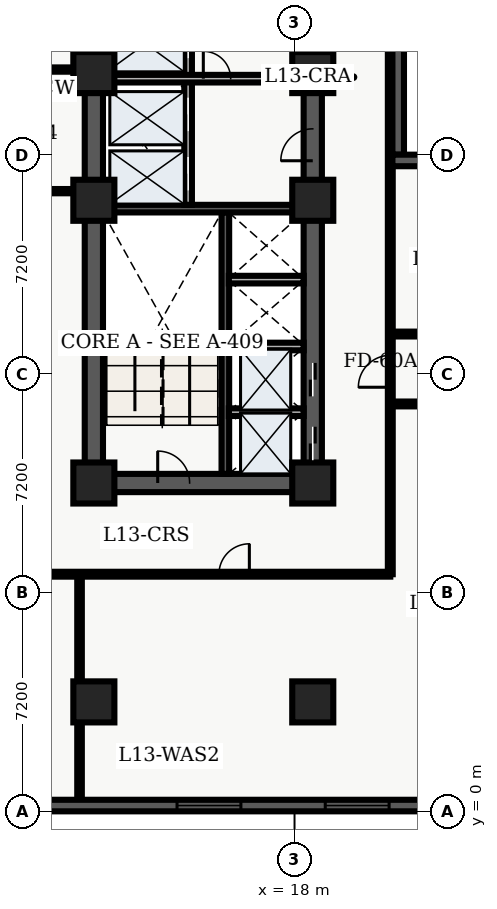
"""IFC4 building model, lengths in metres.
Left out: names, types, materials, properties, quantities, classifications, styles, units other than length and angle.
Written with IfcOpenShell. Run it as: python <this file> out.ifc"""

import sys

from ifc_helpers import new_model, entity, si_unit, converted_unit, direction, frame, origin_with_axes, origin_2d_with_axis, place, context, subcontext, project, spatial, polyline, rectangle, outline, extrude, element, fill, save


model = new_model("IFC4")
c1 = context("Model", 3, precision=1e-05, world=origin_with_axes(), true_north=direction((0.0, 1.0)))
c2 = subcontext(c1, "Body", "Model", "MODEL_VIEW")
j1 = project(units=[si_unit("LENGTHUNIT", "METRE"), converted_unit("PLANEANGLEUNIT", "DEGREE", entity("IfcPlaneAngleMeasure", 0.017), si_unit("PLANEANGLEUNIT", "RADIAN"), dimensions=[0, 0, 0, 0, 0, 0, 0])], contexts=[c1])
p1 = place(None, origin_with_axes())
s1 = spatial("IfcSite", under=j1, at=p1, CompositionType="ELEMENT")
p2 = place(p1, origin_with_axes())
s2 = spatial("IfcBuilding", under=s1, at=p2, CompositionType="ELEMENT")
p3 = place(p2, frame((0.0, 0.0, 56.1), z_axis=(0.0, 0.0, 1.0), x_axis=(1.0, 0.0, 0.0)))
s3 = spatial("IfcBuildingStorey", under=s2, at=p3, CompositionType="ELEMENT", Elevation=56.1)
p4 = place(p3, frame((11.4, 10.8, 0.0), z_axis=(0.0, 0.0, 1.0), x_axis=(0.0, 1.0, 0.0)))
e1 = element("IfcWall", 1, at=p4, inside=s3, PredefinedType="SHEAR", context=c2, shape_type="SweptSolid", body=[
    extrude(outline(polyline([(0.0, -0.3), (27.0, -0.3), (27.0, 0.3), (0.0, 0.3), (0.0, -0.3)])), origin_with_axes(), (0.0, 0.0, 1.0), 3.66),
])
p5 = place(p3, frame((11.4, 10.8, 0.0), z_axis=(0.0, 0.0, 1.0), x_axis=(1.0, 0.0, 0.0)))
e2 = element("IfcWall", 2, at=p5, inside=s3, PredefinedType="SHEAR", context=c2, shape_type="SweptSolid", body=[
    extrude(outline(polyline([(0.0, -0.3), (7.2, -0.3), (7.2, 0.3), (0.0, 0.3), (0.0, -0.3)])), origin_with_axes(), (0.0, 0.0, 1.0), 3.66),
])
p6 = place(p5, frame((2.625, 0.0, 0.0), z_axis=(0.0, 0.0, 1.0), x_axis=(1.0, 0.0, 0.0)))
e3 = element("IfcOpeningElement", 3, at=p6, cuts=e2, PredefinedType="OPENING", context=c2, shape_type="SweptSolid", body=[
    extrude(rectangle(XDim=1.05, YDim=0.62, at=origin_2d_with_axis()), origin_with_axes(), (0.0, 0.0, 1.0), 2.15),
])
p7 = place(p3, frame((18.6, 10.8, 0.0), z_axis=(0.0, 0.0, 1.0), x_axis=(0.0, 1.0, 0.0)))
e4 = element("IfcWall", 4, at=p7, inside=s3, PredefinedType="SHEAR", context=c2, shape_type="SweptSolid", body=[
    extrude(outline(polyline([(0.0, -0.3), (13.5, -0.3), (13.5, 0.3), (0.0, 0.3), (0.0, -0.3)])), origin_with_axes(), (0.0, 0.0, 1.0), 3.66),
])
p8 = place(p7, frame((1.3, 0.0, 0.0), z_axis=(0.0, 0.0, 1.0), x_axis=(1.0, 0.0, 0.0)))
e5 = element("IfcOpeningElement", 5, at=p8, cuts=e4, PredefinedType="OPENING", context=c2, shape_type="SweptSolid", body=[
    extrude(rectangle(XDim=1.1, YDim=0.62, at=origin_2d_with_axis()), origin_with_axes(), (0.0, 0.0, 1.0), 2.15),
])
p9 = place(p7, frame((3.4, 0.0, 0.0), z_axis=(0.0, 0.0, 1.0), x_axis=(1.0, 0.0, 0.0)))
e6 = element("IfcOpeningElement", 6, at=p9, cuts=e4, PredefinedType="OPENING", context=c2, shape_type="SweptSolid", body=[
    extrude(rectangle(XDim=1.1, YDim=0.62, at=origin_2d_with_axis()), origin_with_axes(), (0.0, 0.0, 1.0), 2.15),
])
p10 = place(p7, frame((11.125, 0.0, 0.0), z_axis=(0.0, 0.0, 1.0), x_axis=(1.0, 0.0, 0.0)))
e7 = element("IfcOpeningElement", 7, at=p10, cuts=e4, PredefinedType="OPENING", context=c2, shape_type="SweptSolid", body=[
    extrude(rectangle(XDim=1.05, YDim=0.62, at=origin_2d_with_axis()), origin_with_axes(), (0.0, 0.0, 1.0), 2.15),
])
p11 = place(p3, frame((18.6, 24.3, 0.0), z_axis=(0.0, 0.0, 1.0), x_axis=(0.0, 1.0, 0.0)))
e8 = element("IfcWall", 8, at=p11, inside=s3, PredefinedType="SHEAR", context=c2, shape_type="SweptSolid", body=[
    extrude(outline(polyline([(0.0, -0.3), (13.5, -0.3), (13.5, 0.3), (0.0, 0.3), (0.0, -0.3)])), origin_with_axes(), (0.0, 0.0, 1.0), 3.66),
])
p12 = place(p11, frame((6.725, 0.0, 0.0), z_axis=(0.0, 0.0, 1.0), x_axis=(1.0, 0.0, 0.0)))
e9 = element("IfcOpeningElement", 9, at=p12, cuts=e8, PredefinedType="OPENING", context=c2, shape_type="SweptSolid", body=[
    extrude(rectangle(XDim=1.05, YDim=0.62, at=origin_2d_with_axis()), origin_with_axes(), (0.0, 0.0, 1.0), 2.15),
])
p13 = place(p3, frame((15.725, 11.1, 0.0), z_axis=(0.0, 0.0, 1.0), x_axis=(0.0, 1.0, 0.0)))
e10 = element("IfcWall", 10, at=p13, inside=s3, PredefinedType="SHEAR", context=c2, shape_type="SweptSolid", body=[
    extrude(outline(polyline([(0.0, -0.125), (8.6, -0.125), (8.6, 0.125), (0.0, 0.125), (0.0, -0.125)])), origin_with_axes(), (0.0, 0.0, 1.0), 3.66),
])
p14 = place(p3, frame((11.7, 19.825, 0.0), z_axis=(0.0, 0.0, 1.0), x_axis=(1.0, 0.0, 0.0)))
e11 = element("IfcWall", 11, at=p14, inside=s3, PredefinedType="SHEAR", context=c2, shape_type="SweptSolid", body=[
    extrude(outline(polyline([(0.0, -0.125), (6.6, -0.125), (6.6, 0.125), (0.0, 0.125), (0.0, -0.125)])), origin_with_axes(), (0.0, 0.0, 1.0), 3.66),
])
p15 = place(p3, frame((14.5, 19.95, 0.0), z_axis=(0.0, 0.0, 1.0), x_axis=(0.0, 1.0, 0.0)))
e12 = element("IfcWall", 12, at=p15, inside=s3, PredefinedType="SOLIDWALL", context=c2, shape_type="SweptSolid", body=[
    extrude(outline(polyline([(0.0, -0.125), (6.25, -0.125), (6.25, 0.125), (0.0, 0.125), (0.0, -0.125)])), origin_with_axes(), (0.0, 0.0, 1.0), 2.7),
])
p16 = place(p15, frame((1.025, 0.0, 0.0), z_axis=(0.0, 0.0, 1.0), x_axis=(1.0, 0.0, 0.0)))
e13 = element("IfcOpeningElement", 13, at=p16, cuts=e12, PredefinedType="OPENING", context=c2, shape_type="SweptSolid", body=[
    extrude(rectangle(XDim=1.1, YDim=0.27, at=origin_2d_with_axis()), origin_with_axes(), (0.0, 0.0, 1.0), 2.15),
])
p17 = place(p15, frame((2.975, 0.0, 0.0), z_axis=(0.0, 0.0, 1.0), x_axis=(1.0, 0.0, 0.0)))
e14 = element("IfcOpeningElement", 14, at=p17, cuts=e12, PredefinedType="OPENING", context=c2, shape_type="SweptSolid", body=[
    extrude(rectangle(XDim=1.1, YDim=0.27, at=origin_2d_with_axis()), origin_with_axes(), (0.0, 0.0, 1.0), 2.15),
])
p18 = place(p15, frame((5.425, 0.0, 0.0), z_axis=(0.0, 0.0, 1.0), x_axis=(1.0, 0.0, 0.0)))
e15 = element("IfcOpeningElement", 15, at=p18, cuts=e12, PredefinedType="OPENING", context=c2, shape_type="SweptSolid", body=[
    extrude(rectangle(XDim=1.2, YDim=0.27, at=origin_2d_with_axis()), origin_with_axes(), (0.0, 0.0, 1.0), 2.15),
])
p19 = place(p3, frame((11.7, 24.1, 0.0), z_axis=(0.0, 0.0, 1.0), x_axis=(1.0, 0.0, 0.0)))
e16 = element("IfcWall", 16, at=p19, inside=s3, PredefinedType="SOLIDWALL", context=c2, shape_type="SweptSolid", body=[
    extrude(outline(polyline([(0.0, -0.125), (6.6, -0.125), (6.6, 0.125), (0.0, 0.125), (0.0, -0.125)])), origin_with_axes(), (0.0, 0.0, 1.0), 2.7),
])
p20 = place(p19, frame((3.75, 0.0, 0.0), z_axis=(0.0, 0.0, 1.0), x_axis=(1.0, 0.0, 0.0)))
e17 = element("IfcOpeningElement", 17, at=p20, cuts=e16, PredefinedType="OPENING", context=c2, shape_type="SweptSolid", body=[
    extrude(rectangle(XDim=0.9, YDim=0.27, at=origin_2d_with_axis()), origin_with_axes(), (0.0, 0.0, 1.0), 2.15),
])
for number, where, z_axis, x_axis in (
    (18, (11.4, 3.6, 0.0), (0.0, 0.0, 1.0), (1.0, 0.0, 0.0)),
    (19, (11.4, 10.8, 0.0), (0.0, 0.0, 1.0), (1.0, 0.0, 0.0)),
    (20, (11.4, 20.1, 0.0), (0.0, 0.0, 1.0), (1.0, 0.0, 0.0)),
    (21, (11.4, 24.3, 0.0), (0.0, 0.0, 1.0), (1.0, 0.0, 0.0)),
    (22, (18.6, 3.6, 0.0), (0.0, 0.0, 1.0), (1.0, 0.0, 0.0)),
    (23, (18.6, 10.8, 0.0), (0.0, 0.0, 1.0), (1.0, 0.0, 0.0)),
    (24, (18.6, 20.1, 0.0), (0.0, 0.0, 1.0), (1.0, 0.0, 0.0)),
    (25, (18.6, 24.3, 0.0), (0.0, 0.0, 1.0), (1.0, 0.0, 0.0)),
):
    element("IfcColumn", number, at=place(p3, frame(where, z_axis=z_axis, x_axis=x_axis)), inside=s3, PredefinedType="COLUMN", context=c2, shape_type="SweptSolid", body=[
        extrude(rectangle(XDim=1.35, YDim=1.35, at=origin_2d_with_axis()), origin_with_axes(), (0.0, 0.0, 1.0), 3.9),
    ])
for number, where, z_axis, x_axis in (
    (26, (15.84, 13.13, 0.0), (0.0, 0.0, 1.0), (1.0, 0.0, 0.0)),
    (27, (15.84, 15.29, 0.0), (0.0, 0.0, 1.0), (1.0, 0.0, 0.0)),
    (28, (15.84, 17.49, 0.0), (0.0, 0.0, 1.0), (1.0, 0.0, 0.0)),
):
    element("IfcWall", number, at=place(p3, frame(where, z_axis=z_axis, x_axis=x_axis)), inside=s3, PredefinedType="SOLIDWALL", context=c2, shape_type="SweptSolid", body=[
        extrude(outline(polyline([(0.0, -0.125), (2.46, -0.125), (2.46, 0.125), (0.0, 0.125), (0.0, -0.125)])), origin_with_axes(), (0.0, 0.0, 1.0), 2.7),
    ])
for number, where, z_axis, x_axis in (
    (29, (9.52, 20.4, 0.0), (0.0, 0.0, 1.0), (1.0, 0.0, 0.0)),
    (30, (9.52, 24.4, 0.0), (0.0, 0.0, 1.0), (1.0, 0.0, 0.0)),
):
    element("IfcWall", number, at=place(p3, frame(where, z_axis=z_axis, x_axis=x_axis)), inside=s3, PredefinedType="PARTITIONING", context=c2, shape_type="SweptSolid", body=[
        extrude(outline(polyline([(0.0, -0.07), (1.58, -0.07), (1.58, 0.07), (0.0, 0.07), (0.0, -0.07)])), origin_with_axes(), (0.0, 0.0, 1.0), 2.7),
    ])
p21 = place(p3, frame((2.6, 7.8, 0.0), z_axis=(0.0, 0.0, 1.0), x_axis=(1.0, 0.0, 0.0)))
e31 = element("IfcWall", 31, at=p21, inside=s3, PredefinedType="PARTITIONING", context=c2, shape_type="SweptSolid", body=[
    extrude(outline(polyline([(0.0, -0.08), (18.55, -0.08), (18.55, 0.08), (0.0, 0.08), (0.0, -0.08)])), origin_with_axes(), (0.0, 0.0, 1.0), 2.7),
])
p22 = place(p21, frame((2.91, 0.0, 0.0), z_axis=(0.0, 0.0, 1.0), x_axis=(1.0, 0.0, 0.0)))
e32 = element("IfcOpeningElement", 32, at=p22, cuts=e31, PredefinedType="OPENING", context=c2, shape_type="SweptSolid", body=[
    extrude(rectangle(XDim=1.2, YDim=0.18, at=origin_2d_with_axis()), origin_with_axes(), (0.0, 0.0, 1.0), 2.2),
])
p23 = place(p21, frame((13.415, 0.0, 0.0), z_axis=(0.0, 0.0, 1.0), x_axis=(1.0, 0.0, 0.0)))
e33 = element("IfcOpeningElement", 33, at=p23, cuts=e31, PredefinedType="OPENING", context=c2, shape_type="SweptSolid", body=[
    extrude(rectangle(XDim=1.0, YDim=0.18, at=origin_2d_with_axis()), origin_with_axes(), (0.0, 0.0, 1.0), 2.15),
])
p24 = place(p3, frame((21.15, 7.8, 0.0), z_axis=(0.0, 0.0, 1.0), x_axis=(0.0, 1.0, 0.0)))
e34 = element("IfcWall", 34, at=p24, inside=s3, PredefinedType="PARTITIONING", context=c2, shape_type="SweptSolid", body=[
    extrude(outline(polyline([(0.0, -0.08), (32.7, -0.08), (32.7, 0.08), (0.0, 0.08), (0.0, -0.08)])), origin_with_axes(), (0.0, 0.0, 1.0), 2.7),
])
p25 = place(p24, frame((6.675, 0.0, 0.0), z_axis=(0.0, 0.0, 1.0), x_axis=(1.0, 0.0, 0.0)))
e35 = element("IfcOpeningElement", 35, at=p25, cuts=e34, PredefinedType="OPENING", context=c2, shape_type="SweptSolid", body=[
    extrude(rectangle(XDim=1.05, YDim=0.18, at=origin_2d_with_axis()), origin_with_axes(), (0.0, 0.0, 1.0), 2.15),
])
p26 = place(p3, frame((10.929, 0.36, 0.0), z_axis=(0.0, 0.0, 1.0), x_axis=(0.0, 1.0, 0.0)))
e36 = element("IfcWall", 36, at=p26, inside=s3, PredefinedType="PARTITIONING", context=c2, shape_type="SweptSolid", body=[
    extrude(outline(polyline([(0.0, -0.075), (7.34, -0.075), (7.34, 0.075), (0.0, 0.075), (0.0, -0.075)])), origin_with_axes(), (0.0, 0.0, 1.0), 2.7),
])
p27 = place(p3, frame((21.15, 13.4, 0.0), z_axis=(0.0, 0.0, 1.0), x_axis=(1.0, 0.0, 0.0)))
e37 = element("IfcWall", 37, at=p27, inside=s3, PredefinedType="PARTITIONING", context=c2, shape_type="SweptSolid", body=[
    extrude(outline(polyline([(0.0, -0.08), (15.2, -0.08), (15.2, 0.08), (0.0, 0.08), (0.0, -0.08)])), origin_with_axes(), (0.0, 0.0, 1.0), 2.7),
])
p28 = place(p27, frame((2.284, 0.0, 0.0), z_axis=(0.0, 0.0, 1.0), x_axis=(1.0, 0.0, 0.0)))
e38 = element("IfcOpeningElement", 38, at=p28, cuts=e37, PredefinedType="OPENING", context=c2, shape_type="SweptSolid", body=[
    extrude(rectangle(XDim=1.0, YDim=0.18, at=origin_2d_with_axis()), origin_with_axes(), (0.0, 0.0, 1.0), 2.15),
])
p29 = place(p27, frame((6.853, 0.0, 0.0), z_axis=(0.0, 0.0, 1.0), x_axis=(1.0, 0.0, 0.0)))
e39 = element("IfcOpeningElement", 39, at=p29, cuts=e37, PredefinedType="OPENING", context=c2, shape_type="SweptSolid", body=[
    extrude(rectangle(XDim=1.2, YDim=0.18, at=origin_2d_with_axis()), origin_with_axes(), (0.0, 0.0, 1.0), 2.2),
])
p30 = place(p27, frame((12.219, 0.0, 0.0), z_axis=(0.0, 0.0, 1.0), x_axis=(1.0, 0.0, 0.0)))
e40 = element("IfcOpeningElement", 40, at=p30, cuts=e37, PredefinedType="OPENING", context=c2, shape_type="SweptSolid", body=[
    extrude(rectangle(XDim=1.0, YDim=0.18, at=origin_2d_with_axis()), origin_with_axes(), (0.0, 0.0, 1.0), 2.15),
])
p31 = place(p3, frame((21.15, 15.7, 0.0), z_axis=(0.0, 0.0, 1.0), x_axis=(1.0, 0.0, 0.0)))
e41 = element("IfcWall", 41, at=p31, inside=s3, PredefinedType="PARTITIONING", context=c2, shape_type="SweptSolid", body=[
    extrude(outline(polyline([(0.0, -0.08), (15.2, -0.08), (15.2, 0.08), (0.0, 0.08), (0.0, -0.08)])), origin_with_axes(), (0.0, 0.0, 1.0), 2.7),
])
p32 = place(p31, frame((3.583, 0.0, 0.0), z_axis=(0.0, 0.0, 1.0), x_axis=(1.0, 0.0, 0.0)))
e42 = element("IfcOpeningElement", 42, at=p32, cuts=e41, PredefinedType="OPENING", context=c2, shape_type="SweptSolid", body=[
    extrude(rectangle(XDim=1.0, YDim=0.18, at=origin_2d_with_axis()), origin_with_axes(), (0.0, 0.0, 1.0), 2.15),
])
p33 = place(p31, frame((11.053, 0.0, 0.0), z_axis=(0.0, 0.0, 1.0), x_axis=(1.0, 0.0, 0.0)))
e43 = element("IfcOpeningElement", 43, at=p33, cuts=e41, PredefinedType="OPENING", context=c2, shape_type="SweptSolid", body=[
    extrude(rectangle(XDim=1.0, YDim=0.18, at=origin_2d_with_axis()), origin_with_axes(), (0.0, 0.0, 1.0), 2.15),
])
p34 = place(p3, frame((57.22, 0.19, 0.0), z_axis=(0.0, 0.0, 1.0), x_axis=(-1.0, 0.0, 0.0)))
e44 = element("IfcWall", 44, at=p34, inside=s3, PredefinedType="SOLIDWALL", context=c2, shape_type="SweptSolid", body=[
    extrude(outline(polyline([(0.0, -0.19), (54.82, -0.19), (54.82, 0.19), (0.0, 0.19), (0.0, -0.19)])), origin_with_axes(), (0.0, 0.0, 1.0), 3.66),
])
p35 = place(p34, frame((3.037, 0.0, 0.45), z_axis=(0.0, 0.0, 1.0), x_axis=(1.0, 0.0, 0.0)))
e45 = element("IfcOpeningElement", 45, at=p35, cuts=e44, PredefinedType="OPENING", context=c2, shape_type="SweptSolid", body=[
    extrude(rectangle(XDim=2.1, YDim=0.4, at=origin_2d_with_axis()), origin_with_axes(), (0.0, 0.0, 1.0), 2.2),
])
p36 = place(p34, frame((7.912, 0.0, 0.45), z_axis=(0.0, 0.0, 1.0), x_axis=(1.0, 0.0, 0.0)))
e46 = element("IfcOpeningElement", 46, at=p36, cuts=e44, PredefinedType="OPENING", context=c2, shape_type="SweptSolid", body=[
    extrude(rectangle(XDim=2.1, YDim=0.4, at=origin_2d_with_axis()), origin_with_axes(), (0.0, 0.0, 1.0), 2.2),
])
p37 = place(p34, frame((12.786, 0.0, 0.45), z_axis=(0.0, 0.0, 1.0), x_axis=(1.0, 0.0, 0.0)))
e47 = element("IfcOpeningElement", 47, at=p37, cuts=e44, PredefinedType="OPENING", context=c2, shape_type="SweptSolid", body=[
    extrude(rectangle(XDim=2.1, YDim=0.4, at=origin_2d_with_axis()), origin_with_axes(), (0.0, 0.0, 1.0), 2.2),
])
p38 = place(p34, frame((17.661, 0.0, 0.45), z_axis=(0.0, 0.0, 1.0), x_axis=(1.0, 0.0, 0.0)))
e48 = element("IfcOpeningElement", 48, at=p38, cuts=e44, PredefinedType="OPENING", context=c2, shape_type="SweptSolid", body=[
    extrude(rectangle(XDim=2.1, YDim=0.4, at=origin_2d_with_axis()), origin_with_axes(), (0.0, 0.0, 1.0), 2.2),
])
p39 = place(p34, frame((22.535, 0.0, 0.45), z_axis=(0.0, 0.0, 1.0), x_axis=(1.0, 0.0, 0.0)))
e49 = element("IfcOpeningElement", 49, at=p39, cuts=e44, PredefinedType="OPENING", context=c2, shape_type="SweptSolid", body=[
    extrude(rectangle(XDim=2.1, YDim=0.4, at=origin_2d_with_axis()), origin_with_axes(), (0.0, 0.0, 1.0), 2.2),
])
p40 = place(p34, frame((37.159, 0.0, 0.45), z_axis=(0.0, 0.0, 1.0), x_axis=(1.0, 0.0, 0.0)))
e50 = element("IfcOpeningElement", 50, at=p40, cuts=e44, PredefinedType="OPENING", context=c2, shape_type="SweptSolid", body=[
    extrude(rectangle(XDim=2.1, YDim=0.4, at=origin_2d_with_axis()), origin_with_axes(), (0.0, 0.0, 1.0), 2.2),
])
p41 = place(p34, frame((42.034, 0.0, 0.45), z_axis=(0.0, 0.0, 1.0), x_axis=(1.0, 0.0, 0.0)))
e51 = element("IfcOpeningElement", 51, at=p41, cuts=e44, PredefinedType="OPENING", context=c2, shape_type="SweptSolid", body=[
    extrude(rectangle(XDim=2.1, YDim=0.4, at=origin_2d_with_axis()), origin_with_axes(), (0.0, 0.0, 1.0), 2.2),
])
p42 = place(p34, frame((51.783, 0.0, 0.45), z_axis=(0.0, 0.0, 1.0), x_axis=(1.0, 0.0, 0.0)))
e52 = element("IfcOpeningElement", 52, at=p42, cuts=e44, PredefinedType="OPENING", context=c2, shape_type="SweptSolid", body=[
    extrude(rectangle(XDim=2.1, YDim=0.4, at=origin_2d_with_axis()), origin_with_axes(), (0.0, 0.0, 1.0), 2.2),
])
p43 = place(p3, frame((21.41, 45.82, 0.0), z_axis=(0.0, 0.0, 1.0), x_axis=(0.0, -1.0, 0.0)))
e53 = element("IfcWall", 53, at=p43, inside=s3, PredefinedType="SOLIDWALL", context=c2, shape_type="SweptSolid", body=[
    extrude(outline(polyline([(0.0, -0.19), (24.22, -0.19), (24.22, 0.19), (0.0, 0.19), (0.0, -0.19)])), origin_with_axes(), (0.0, 0.0, 1.0), 3.66),
])
p44 = place(p43, frame((2.902, 0.0, 0.45), z_axis=(0.0, 0.0, 1.0), x_axis=(1.0, 0.0, 0.0)))
e54 = element("IfcOpeningElement", 54, at=p44, cuts=e53, PredefinedType="OPENING", context=c2, shape_type="SweptSolid", body=[
    extrude(rectangle(XDim=2.1, YDim=0.4, at=origin_2d_with_axis()), origin_with_axes(), (0.0, 0.0, 1.0), 2.2),
])
p45 = place(p3, frame((21.22, 21.41, 0.0), z_axis=(0.0, 0.0, 1.0), x_axis=(1.0, 0.0, 0.0)))
e55 = element("IfcWall", 55, at=p45, inside=s3, PredefinedType="SOLIDWALL", context=c2, shape_type="SweptSolid", body=[
    extrude(outline(polyline([(0.0, -0.19), (17.18, -0.19), (17.18, 0.19), (0.0, 0.19), (0.0, -0.19)])), origin_with_axes(), (0.0, 0.0, 1.0), 3.66),
])
p46 = place(p45, frame((3.263, 0.0, 0.45), z_axis=(0.0, 0.0, 1.0), x_axis=(1.0, 0.0, 0.0)))
e56 = element("IfcOpeningElement", 56, at=p46, cuts=e55, PredefinedType="OPENING", context=c2, shape_type="SweptSolid", body=[
    extrude(rectangle(XDim=2.1, YDim=0.4, at=origin_2d_with_axis()), origin_with_axes(), (0.0, 0.0, 1.0), 2.2),
])
p47 = place(p45, frame((8.59, 0.0, 0.45), z_axis=(0.0, 0.0, 1.0), x_axis=(1.0, 0.0, 0.0)))
e57 = element("IfcOpeningElement", 57, at=p47, cuts=e55, PredefinedType="OPENING", context=c2, shape_type="SweptSolid", body=[
    extrude(rectangle(XDim=2.1, YDim=0.4, at=origin_2d_with_axis()), origin_with_axes(), (0.0, 0.0, 1.0), 2.2),
])
p48 = place(p45, frame((13.467, 0.0, 0.45), z_axis=(0.0, 0.0, 1.0), x_axis=(1.0, 0.0, 0.0)))
e58 = element("IfcOpeningElement", 58, at=p48, cuts=e55, PredefinedType="OPENING", context=c2, shape_type="SweptSolid", body=[
    extrude(rectangle(XDim=2.1, YDim=0.4, at=origin_2d_with_axis()), origin_with_axes(), (0.0, 0.0, 1.0), 2.2),
])
p49 = place(p7, frame((1.3, 0.0, 0.0), z_axis=(0.0, 0.0, 1.0), x_axis=(1.0, 0.0, 0.0)))
e59 = element("IfcDoor", 59, at=p49, inside=s3, OperationType="SLIDING_TO_LEFT", PredefinedType="DOOR", context=c2, shape_type="SweptSolid", body=[
    extrude(rectangle(XDim=1.1, YDim=0.09, at=origin_2d_with_axis()), origin_with_axes(), (0.0, 0.0, 1.0), 2.15),
])
fill(e5, e59)
p50 = place(p7, frame((3.4, 0.0, 0.0), z_axis=(0.0, 0.0, 1.0), x_axis=(1.0, 0.0, 0.0)))
e60 = element("IfcDoor", 60, at=p50, inside=s3, OperationType="SLIDING_TO_RIGHT", PredefinedType="DOOR", context=c2, shape_type="SweptSolid", body=[
    extrude(rectangle(XDim=1.1, YDim=0.09, at=origin_2d_with_axis()), origin_with_axes(), (0.0, 0.0, 1.0), 2.15),
])
fill(e6, e60)
p51 = place(p15, frame((1.025, 0.0, 0.0), z_axis=(0.0, 0.0, 1.0), x_axis=(1.0, 0.0, 0.0)))
e61 = element("IfcDoor", 61, at=p51, inside=s3, OperationType="SLIDING_TO_LEFT", PredefinedType="DOOR", context=c2, shape_type="SweptSolid", body=[
    extrude(rectangle(XDim=1.1, YDim=0.09, at=origin_2d_with_axis()), origin_with_axes(), (0.0, 0.0, 1.0), 2.15),
])
fill(e13, e61)
p52 = place(p15, frame((2.975, 0.0, 0.0), z_axis=(0.0, 0.0, 1.0), x_axis=(1.0, 0.0, 0.0)))
e62 = element("IfcDoor", 62, at=p52, inside=s3, OperationType="SLIDING_TO_RIGHT", PredefinedType="DOOR", context=c2, shape_type="SweptSolid", body=[
    extrude(rectangle(XDim=1.1, YDim=0.09, at=origin_2d_with_axis()), origin_with_axes(), (0.0, 0.0, 1.0), 2.15),
])
fill(e14, e62)
p53 = place(p15, frame((5.425, 0.0, 0.0), z_axis=(0.0, 0.0, 1.0), x_axis=(1.0, 0.0, 0.0)))
e63 = element("IfcDoor", 63, at=p53, inside=s3, OperationType="DOUBLE_DOOR_SLIDING", PredefinedType="DOOR", context=c2, shape_type="SweptSolid", body=[
    extrude(rectangle(XDim=1.2, YDim=0.09, at=origin_2d_with_axis()), origin_with_axes(), (0.0, 0.0, 1.0), 2.15),
])
fill(e15, e63)
p54 = place(p5, frame((2.625, 0.0, 0.0), z_axis=(0.0, 0.0, 1.0), x_axis=(1.0, 0.0, 0.0)))
e64 = element("IfcDoor", 64, at=p54, inside=s3, OperationType="SINGLE_SWING_LEFT", PredefinedType="DOOR", context=c2, shape_type="SweptSolid", body=[
    extrude(rectangle(XDim=1.05, YDim=0.09, at=origin_2d_with_axis()), origin_with_axes(), (0.0, 0.0, 1.0), 2.15),
])
fill(e3, e64)
p55 = place(p7, frame((11.125, 0.0, 0.0), z_axis=(0.0, 0.0, 1.0), x_axis=(1.0, 0.0, 0.0)))
e65 = element("IfcDoor", 65, at=p55, inside=s3, OperationType="SINGLE_SWING_LEFT", PredefinedType="DOOR", context=c2, shape_type="SweptSolid", body=[
    extrude(rectangle(XDim=1.05, YDim=0.09, at=origin_2d_with_axis()), origin_with_axes(), (0.0, 0.0, 1.0), 2.15),
])
fill(e7, e65)
p56 = place(p19, frame((3.75, 0.0, 0.0), z_axis=(0.0, 0.0, 1.0), x_axis=(1.0, 0.0, 0.0)))
e66 = element("IfcDoor", 66, at=p56, inside=s3, OperationType="SINGLE_SWING_LEFT", PredefinedType="DOOR", context=c2, shape_type="SweptSolid", body=[
    extrude(rectangle(XDim=0.9, YDim=0.09, at=origin_2d_with_axis()), origin_with_axes(), (0.0, 0.0, 1.0), 2.15),
])
fill(e17, e66)
p57 = place(p21, frame((13.415, 0.0, 0.0), z_axis=(0.0, 0.0, 1.0), x_axis=(1.0, 0.0, 0.0)))
e67 = element("IfcDoor", 67, at=p57, inside=s3, OperationType="SINGLE_SWING_RIGHT", PredefinedType="DOOR", context=c2, shape_type="SweptSolid", body=[
    extrude(rectangle(XDim=1.0, YDim=0.09, at=origin_2d_with_axis()), origin_with_axes(), (0.0, 0.0, 1.0), 2.15),
])
fill(e33, e67)
p58 = place(p24, frame((6.675, 0.0, 0.0), z_axis=(0.0, 0.0, 1.0), x_axis=(1.0, 0.0, 0.0)))
e68 = element("IfcDoor", 68, at=p58, inside=s3, OperationType="SINGLE_SWING_LEFT", PredefinedType="DOOR", context=c2, shape_type="SweptSolid", body=[
    extrude(rectangle(XDim=1.05, YDim=0.09, at=origin_2d_with_axis()), origin_with_axes(), (0.0, 0.0, 1.0), 2.15),
])
fill(e35, e68)
p59 = place(p34, frame((37.159, 0.0, 0.45), z_axis=(0.0, 0.0, 1.0), x_axis=(1.0, 0.0, 0.0)))
e69 = element("IfcWindow", 69, at=p59, inside=s3, PredefinedType="WINDOW", context=c2, shape_type="SweptSolid", body=[
    extrude(rectangle(XDim=2.1, YDim=0.09, at=origin_2d_with_axis()), origin_with_axes(), (0.0, 0.0, 1.0), 2.2),
])
fill(e50, e69)
p60 = place(p34, frame((42.034, 0.0, 0.45), z_axis=(0.0, 0.0, 1.0), x_axis=(1.0, 0.0, 0.0)))
e70 = element("IfcWindow", 70, at=p60, inside=s3, PredefinedType="WINDOW", context=c2, shape_type="SweptSolid", body=[
    extrude(rectangle(XDim=2.1, YDim=0.09, at=origin_2d_with_axis()), origin_with_axes(), (0.0, 0.0, 1.0), 2.2),
])
fill(e51, e70)
save(model, sys.argv[1])
